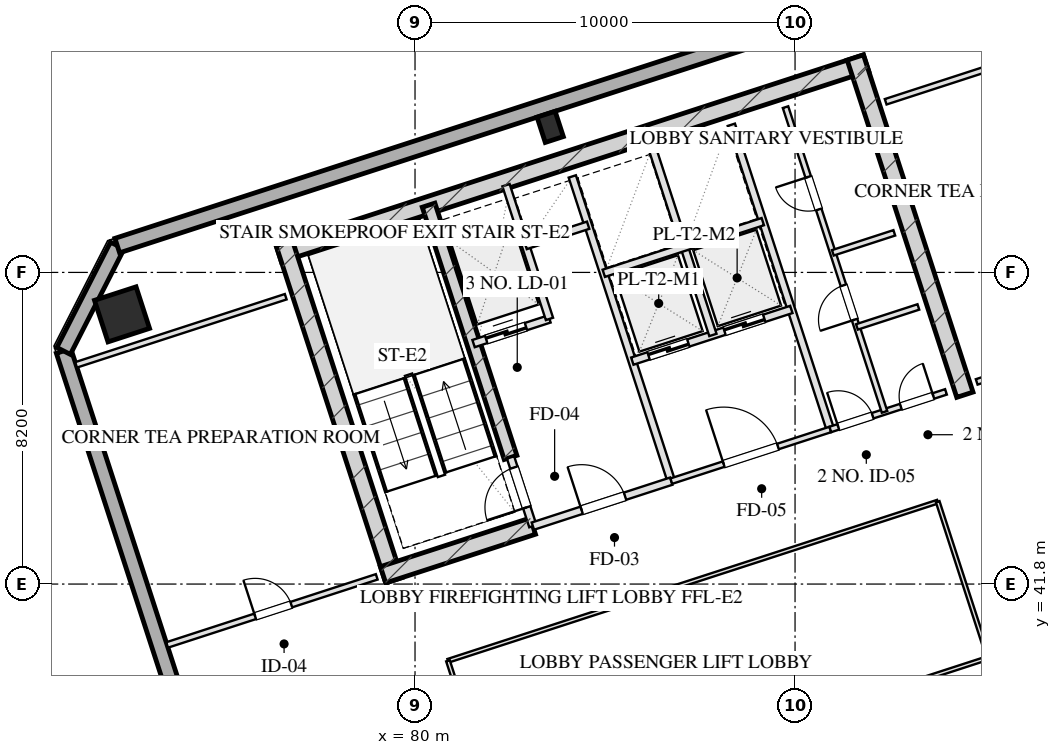
"""IFC4 building model, lengths in metres.
Left out: names, types, materials, properties, quantities, classifications, styles, units other than length and angle.
Written with IfcOpenShell. Run it as: python <this file> out.ifc"""

import sys

from ifc_helpers import new_model, si_unit, direction, frame, frame_2d, origin, origin_2d, place, context, subcontext, project, spatial, rectangle, hollow_rectangle, extrude, element, fill, save


model = new_model("IFC4")
c1 = context("Model", 3, precision=1e-05, world=origin(), true_north=direction((0.0, 1.0)))
c2 = subcontext(c1, "Body", "Model", "MODEL_VIEW")
j1 = project(units=[si_unit("LENGTHUNIT", "METRE"), si_unit("PLANEANGLEUNIT", "RADIAN")], contexts=[c1])
p1 = place(None, origin())
s1 = spatial("IfcSite", under=j1, at=p1, CompositionType="ELEMENT")
p2 = place(p1, origin())
s2 = spatial("IfcBuilding", under=s1, at=p2, CompositionType="ELEMENT")
p3 = place(p2, frame((0.0, 0.0, 209.3)))
s3 = spatial("IfcBuildingStorey", under=s2, at=p3, CompositionType="ELEMENT", Elevation=209.3)
p4 = place(p3, frame((76.415, 50.489, 0.0), z_axis=(0.0, 0.0, 1.0), x_axis=(0.951056810414, 0.309016089169, 0.0)))
e1 = element("IfcWall", 1, at=p4, inside=s3, PredefinedType="SHEAR", context=c2, shape_type="SweptSolid", body=[
    extrude(rectangle(XDim=16.25, YDim=0.45, at=frame_2d((8.125, 0.0))), origin(), (0.0, 0.0, 1.0), 3.45),
])
for number, where, z_axis, x_axis in (
    (2, (79.442, 41.899, 0.0), (0.0, 0.0, 1.0), (-0.309, 0.951, 0.0)),
    (3, (94.469, 46.781, 0.0), (0.0, 0.0, 1.0), (-0.309, 0.951, 0.0)),
):
    element("IfcWall", number, at=place(p3, frame(where, z_axis=z_axis, x_axis=x_axis)), inside=s3, PredefinedType="SHEAR", context=c2, shape_type="SweptSolid", body=[
        extrude(rectangle(XDim=9.33, YDim=0.45, at=frame_2d((4.665, 0.0))), origin(), (0.0, 0.0, 1.0), 3.45),
    ])
p5 = place(p3, frame((82.514, 45.131, 0.0), z_axis=(0.0, 0.0, 1.0), x_axis=(-0.308988790936, 0.951065679686, 0.0)))
e4 = element("IfcWall", 4, at=p5, inside=s3, PredefinedType="SHEAR", context=c2, shape_type="SweptSolid", body=[
    extrude(rectangle(XDim=6.98, YDim=0.35, at=frame_2d((3.49, 0.0))), origin(), (0.0, 0.0, 1.0), 3.45),
])
p6 = place(p3, frame((79.159, 42.043, 0.0), z_axis=(0.0, 0.0, 1.0), x_axis=(0.951047485828, 0.309044785913, 0.0)))
e5 = element("IfcWall", 5, at=p6, inside=s3, PredefinedType="SHEAR", context=c2, shape_type="SweptSolid", body=[
    extrude(rectangle(XDim=4.145, YDim=0.45, at=frame_2d((2.073, 0.0))), origin(), (0.0, 0.0, 1.0), 3.45),
])
for number, where, z_axis, x_axis in (
    (6, (95.572, 56.461, 0.0), (0.0, 0.0, 1.0), (0.951, 0.309, 0.0)),
    (7, (72.29, 48.896, 0.0), (0.0, 0.0, 1.0), (0.951, 0.309, 0.0)),
):
    element("IfcColumn", number, at=place(p3, frame(where, z_axis=z_axis, x_axis=x_axis)), inside=s3, PredefinedType="COLUMN", context=c2, shape_type="SweptSolid", body=[
        extrude(hollow_rectangle(XDim=1.15, YDim=1.15, WallThickness=0.04, at=origin_2d()), origin(), (0.0, 0.0, 1.0), 3.451),
    ])
p7 = place(p3, frame((83.557, 53.83, 0.0), z_axis=(0.0, 0.0, 1.0), x_axis=(0.951056516295, 0.309016994375, 0.0)))
e8 = element("IfcColumn", 8, at=p7, inside=s3, PredefinedType="COLUMN", context=c2, shape_type="SweptSolid", body=[
    extrude(hollow_rectangle(XDim=0.5, YDim=0.7, WallThickness=0.025, at=origin_2d()), origin(), (0.0, 0.0, 1.0), 3.451),
])
p8 = place(p3, frame((82.618, 11.414, 0.0), z_axis=(0.0, 0.0, 1.0), x_axis=(-0.309016491071, 0.951056679828, 0.0)))
e9 = element("IfcWall", 9, at=p8, inside=s3, PredefinedType="SOLIDWALL", context=c2, shape_type="SweptSolid", body=[
    extrude(rectangle(XDim=38.4, YDim=0.4, at=frame_2d((19.2, 0.0))), origin(), (0.0, 0.0, 1.0), 2.61),
])
p9 = place(p8, frame((20.75, 0.0, 0.75)))
e10 = element("IfcOpeningElement", 10, at=p9, cuts=e9, PredefinedType="OPENING", context=c2, shape_type="SweptSolid", body=[
    extrude(rectangle(XDim=2.1, YDim=1.46, at=frame_2d((1.05, 0.73))), frame((0.0, 0.21, 0.0), z_axis=(0.0, -1.0, 0.0), x_axis=(1.0, 0.0, 0.0)), (0.0, 0.0, 1.0), 0.42),
])
p10 = place(p8, frame((24.55, 0.0, 0.75)))
e11 = element("IfcOpeningElement", 11, at=p10, cuts=e9, PredefinedType="OPENING", context=c2, shape_type="SweptSolid", body=[
    extrude(rectangle(XDim=2.1, YDim=1.46, at=frame_2d((1.05, 0.73))), frame((0.0, 0.21, 0.0), z_axis=(0.0, -1.0, 0.0), x_axis=(1.0, 0.0, 0.0)), (0.0, 0.0, 1.0), 0.42),
])
p11 = place(p8, frame((15.55, 0.0, 0.0)))
e12 = element("IfcOpeningElement", 12, at=p11, cuts=e9, PredefinedType="OPENING", context=c2, shape_type="SweptSolid", body=[
    extrude(rectangle(XDim=1.1, YDim=2.15, at=frame_2d((0.55, 1.075))), frame((0.0, 0.21, 0.0), z_axis=(0.0, -1.0, 0.0), x_axis=(1.0, 0.0, 0.0)), (0.0, 0.0, 1.0), 0.42),
])
p12 = place(p3, frame((70.752, 47.934, 0.0), z_axis=(0.0, 0.0, 1.0), x_axis=(0.453949291228, 0.891027519774, 0.0)))
e13 = element("IfcWall", 13, at=p12, inside=s3, PredefinedType="SOLIDWALL", context=c2, shape_type="SweptSolid", body=[
    extrude(rectangle(XDim=3.111, YDim=0.4, at=frame_2d((1.556, 0.0))), origin(), (0.0, 0.0, 1.0), 2.61),
])
p13 = place(p3, frame((72.165, 50.706, 0.0), z_axis=(0.0, 0.0, 1.0), x_axis=(0.951058012937, 0.309012388148, 0.0)))
e14 = element("IfcWall", 14, at=p13, inside=s3, PredefinedType="SOLIDWALL", context=c2, shape_type="SweptSolid", body=[
    extrude(rectangle(XDim=23.6, YDim=0.4, at=frame_2d((11.8, 0.0))), origin(), (0.0, 0.0, 1.0), 2.61),
])
p14 = place(p3, frame((83.101, 43.324, 0.0), z_axis=(0.0, 0.0, 1.0), x_axis=(-0.309048298632, 0.951046344356, 0.0)))
e15 = element("IfcWall", 15, at=p14, inside=s3, PredefinedType="PARTITIONING", context=c2, shape_type="SweptSolid", body=[
    extrude(rectangle(XDim=1.9, YDim=0.2, at=frame_2d((0.95, 0.0))), origin(), (0.0, 0.0, 1.0), 3.175),
])
p15 = place(p14, frame((0.52, 0.0, 0.0)))
e16 = element("IfcOpeningElement", 16, at=p15, cuts=e15, PredefinedType="OPENING", context=c2, shape_type="SweptSolid", body=[
    extrude(rectangle(XDim=1.1, YDim=2.05, at=frame_2d((0.55, 1.025))), frame((0.0, 0.11, 0.0), z_axis=(0.0, -1.0, 0.0), x_axis=(1.0, 0.0, 0.0)), (0.0, 0.0, 1.0), 0.22),
])
p16 = place(p3, frame((86.743, 44.508, 0.0), z_axis=(0.0, 0.0, 1.0), x_axis=(-0.309016001439, 0.951056838919, 0.0)))
e17 = element("IfcWall", 17, at=p16, inside=s3, PredefinedType="PARTITIONING", context=c2, shape_type="SweptSolid", body=[
    extrude(rectangle(XDim=8.43, YDim=0.2, at=frame_2d((4.215, 0.0))), origin(), (0.0, 0.0, 1.0), 3.175),
])
p17 = place(p3, frame((83.101, 43.324, 0.0), z_axis=(0.0, 0.0, 1.0), x_axis=(0.951052804469, 0.309028417967, 0.0)))
e18 = element("IfcWall", 18, at=p17, inside=s3, PredefinedType="PARTITIONING", context=c2, shape_type="SweptSolid", body=[
    extrude(rectangle(XDim=3.83, YDim=0.2, at=frame_2d((1.915, 0.0))), origin(), (0.0, 0.0, 1.0), 3.175),
])
p18 = place(p17, frame((1.35, 0.0, 0.0)))
e19 = element("IfcOpeningElement", 19, at=p18, cuts=e18, PredefinedType="OPENING", context=c2, shape_type="SweptSolid", body=[
    extrude(rectangle(XDim=1.2, YDim=2.05, at=frame_2d((0.6, 1.025))), frame((0.0, 0.11, 0.0), z_axis=(0.0, -1.0, 0.0), x_axis=(1.0, 0.0, 0.0)), (0.0, 0.0, 1.0), 0.22),
])
p19 = place(p3, frame((81.54, 48.127, 0.0), z_axis=(0.0, 0.0, 1.0), x_axis=(0.951062257173, 0.308999325213, 0.0)))
e20 = element("IfcWall", 20, at=p19, inside=s3, PredefinedType="PARTITIONING", context=c2, shape_type="SweptSolid", body=[
    extrude(rectangle(XDim=2.1, YDim=0.2, at=frame_2d((1.05, 0.0))), origin(), (0.0, 0.0, 1.0), 3.175),
])
p20 = place(p19, frame((0.35, 0.0, 0.0)))
e21 = element("IfcOpeningElement", 21, at=p20, cuts=e20, PredefinedType="OPENING", context=c2, shape_type="SweptSolid", body=[
    extrude(rectangle(XDim=1.1, YDim=2.05, at=frame_2d((0.55, 1.025))), frame((0.0, 0.11, 0.0), z_axis=(0.0, -1.0, 0.0), x_axis=(1.0, 0.0, 0.0)), (0.0, 0.0, 1.0), 0.22),
])
p21 = place(p3, frame((83.538, 48.776, 0.0), z_axis=(0.0, 0.0, 1.0), x_axis=(-0.3089935693, 0.951064127245, 0.0)))
e22 = element("IfcWall", 22, at=p21, inside=s3, PredefinedType="PARTITIONING", context=c2, shape_type="SweptSolid", body=[
    extrude(rectangle(XDim=3.7, YDim=0.2, at=frame_2d((1.85, 0.0))), origin(), (0.0, 0.0, 1.0), 3.175),
])
p22 = place(p3, frame((82.91, 50.707, 0.0), z_axis=(0.0, 0.0, 1.0), x_axis=(0.951041328149, 0.309063734775, 0.0)))
e23 = element("IfcWall", 23, at=p22, inside=s3, PredefinedType="PARTITIONING", context=c2, shape_type="SweptSolid", body=[
    extrude(rectangle(XDim=1.73, YDim=0.2, at=frame_2d((0.865, 0.0))), origin(), (0.0, 0.0, 1.0), 3.175),
])
p23 = place(p3, frame((90.928, 45.868, 0.0), z_axis=(0.0, 0.0, 1.0), x_axis=(-0.309042196757, 0.951048327176, 0.0)))
e24 = element("IfcWall", 24, at=p23, inside=s3, PredefinedType="PARTITIONING", context=c2, shape_type="SweptSolid", body=[
    extrude(rectangle(XDim=8.43, YDim=0.2, at=frame_2d((4.215, 0.0))), origin(), (0.0, 0.0, 1.0), 3.175),
])
p24 = place(p3, frame((86.743, 44.508, 0.0), z_axis=(0.0, 0.0, 1.0), x_axis=(0.951063829732, 0.308994485023, 0.0)))
e25 = element("IfcWall", 25, at=p24, inside=s3, PredefinedType="PARTITIONING", context=c2, shape_type="SweptSolid", body=[
    extrude(rectangle(XDim=4.4, YDim=0.15, at=frame_2d((2.2, 0.0))), origin(), (0.0, 0.0, 1.0), 3.175),
])
p25 = place(p24, frame((1.45, 0.0, 0.0)))
e26 = element("IfcOpeningElement", 26, at=p25, cuts=e25, PredefinedType="OPENING", context=c2, shape_type="SweptSolid", body=[
    extrude(rectangle(XDim=1.5, YDim=2.05, at=frame_2d((0.75, 1.025))), frame((0.0, 0.085, 0.0), z_axis=(0.0, -1.0, 0.0), x_axis=(1.0, 0.0, 0.0)), (0.0, 0.0, 1.0), 0.17),
])
p26 = place(p3, frame((85.718, 47.666, 0.0), z_axis=(0.0, 0.0, 1.0), x_axis=(0.951058531764, 0.30901079133, 0.0)))
e27 = element("IfcWall", 27, at=p26, inside=s3, PredefinedType="PARTITIONING", context=c2, shape_type="SweptSolid", body=[
    extrude(rectangle(XDim=4.4, YDim=0.2, at=frame_2d((2.2, 0.0))), origin(), (0.0, 0.0, 1.0), 3.175),
])
p27 = place(p26, frame((0.45, 0.0, 0.0)))
e28 = element("IfcOpeningElement", 28, at=p27, cuts=e27, PredefinedType="OPENING", context=c2, shape_type="SweptSolid", body=[
    extrude(rectangle(XDim=1.1, YDim=2.05, at=frame_2d((0.55, 1.025))), frame((0.0, 0.11, 0.0), z_axis=(0.0, -1.0, 0.0), x_axis=(1.0, 0.0, 0.0)), (0.0, 0.0, 1.0), 0.22),
])
p28 = place(p26, frame((2.55, 0.0, 0.0)))
e29 = element("IfcOpeningElement", 29, at=p28, cuts=e27, PredefinedType="OPENING", context=c2, shape_type="SweptSolid", body=[
    extrude(rectangle(XDim=1.1, YDim=2.05, at=frame_2d((0.55, 1.025))), frame((0.0, 0.11, 0.0), z_axis=(0.0, -1.0, 0.0), x_axis=(1.0, 0.0, 0.0)), (0.0, 0.0, 1.0), 0.22),
])
p29 = place(p3, frame((87.838, 48.354, 0.0), z_axis=(0.0, 0.0, 1.0), x_axis=(-0.3090093719, 0.951058992953, 0.0)))
e30 = element("IfcWall", 30, at=p29, inside=s3, PredefinedType="PARTITIONING", context=c2, shape_type="SweptSolid", body=[
    extrude(rectangle(XDim=5.11, YDim=0.2, at=frame_2d((2.555, 0.0))), origin(), (0.0, 0.0, 1.0), 3.175),
])
p30 = place(p3, frame((84.967, 49.977, 0.0), z_axis=(0.0, 0.0, 1.0), x_axis=(0.951063829732, 0.308994485023, 0.0)))
e31 = element("IfcWall", 31, at=p30, inside=s3, PredefinedType="PARTITIONING", context=c2, shape_type="SweptSolid", body=[
    extrude(rectangle(XDim=4.4, YDim=0.2, at=frame_2d((2.2, 0.0))), origin(), (0.0, 0.0, 1.0), 3.175),
])
p31 = place(p3, frame((90.928, 45.868, 0.0), z_axis=(0.0, 0.0, 1.0), x_axis=(0.951059297078, 0.309008435874, 0.0)))
e32 = element("IfcWall", 32, at=p31, inside=s3, PredefinedType="PARTITIONING", context=c2, shape_type="SweptSolid", body=[
    extrude(rectangle(XDim=3.2, YDim=0.15, at=frame_2d((1.6, 0.0))), origin(), (0.0, 0.0, 1.0), 3.175),
])
p32 = place(p31, frame((0.22, 0.0, 0.0)))
e33 = element("IfcOpeningElement", 33, at=p32, cuts=e32, PredefinedType="OPENING", context=c2, shape_type="SweptSolid", body=[
    extrude(rectangle(XDim=0.95, YDim=2.05, at=frame_2d((0.475, 1.025))), frame((0.0, 0.085, 0.0), z_axis=(0.0, -1.0, 0.0), x_axis=(1.0, 0.0, 0.0)), (0.0, 0.0, 1.0), 0.17),
])
p33 = place(p31, frame((1.95, 0.0, 0.0)))
e34 = element("IfcOpeningElement", 34, at=p33, cuts=e32, PredefinedType="OPENING", context=c2, shape_type="SweptSolid", body=[
    extrude(rectangle(XDim=0.9, YDim=2.05, at=frame_2d((0.45, 1.025))), frame((0.0, 0.085, 0.0), z_axis=(0.0, -1.0, 0.0), x_axis=(1.0, 0.0, 0.0)), (0.0, 0.0, 1.0), 0.17),
])
p34 = place(p3, frame((92.355, 46.331, 0.0), z_axis=(0.0, 0.0, 1.0), x_axis=(-0.309007490203, 0.951059604335, 0.0)))
e35 = element("IfcWall", 35, at=p34, inside=s3, PredefinedType="PARTITIONING", context=c2, shape_type="SweptSolid", body=[
    extrude(rectangle(XDim=8.43, YDim=0.15, at=frame_2d((4.215, 0.0))), origin(), (0.0, 0.0, 1.0), 3.175),
])
p35 = place(p34, frame((2.55, 0.0, 0.0)))
e36 = element("IfcOpeningElement", 36, at=p35, cuts=e35, PredefinedType="OPENING", context=c2, shape_type="SweptSolid", body=[
    extrude(rectangle(XDim=0.95, YDim=2.05, at=frame_2d((0.475, 1.025))), frame((0.0, 0.085, 0.0), z_axis=(0.0, -1.0, 0.0), x_axis=(1.0, 0.0, 0.0)), (0.0, 0.0, 1.0), 0.17),
])
p36 = place(p34, frame((5.6, 0.0, 0.0)))
e37 = element("IfcOpeningElement", 37, at=p36, cuts=e35, PredefinedType="OPENING", context=c2, shape_type="SweptSolid", body=[
    extrude(rectangle(XDim=0.9, YDim=2.05, at=frame_2d((0.45, 1.025))), frame((0.0, 0.085, 0.0), z_axis=(0.0, -1.0, 0.0), x_axis=(1.0, 0.0, 0.0)), (0.0, 0.0, 1.0), 0.17),
])
p37 = place(p3, frame((90.995, 50.516, 0.0), z_axis=(0.0, 0.0, 1.0), x_axis=(0.951040401051, 0.309066587596, 0.0)))
e38 = element("IfcWall", 38, at=p37, inside=s3, PredefinedType="PARTITIONING", context=c2, shape_type="SweptSolid", body=[
    extrude(rectangle(XDim=1.7, YDim=0.15, at=frame_2d((0.85, 0.0))), origin(), (0.0, 0.0, 1.0), 3.175),
])
p38 = place(p3, frame((91.628, 48.566, 0.0), z_axis=(0.0, 0.0, 1.0), x_axis=(0.951054116971, 0.309024378638, 0.0)))
e39 = element("IfcWall", 39, at=p38, inside=s3, PredefinedType="PARTITIONING", context=c2, shape_type="SweptSolid", body=[
    extrude(rectangle(XDim=1.7, YDim=0.15, at=frame_2d((0.85, 0.0))), origin(), (0.0, 0.0, 1.0), 3.175),
])
p39 = place(p3, frame((71.081, 47.568, 0.0), z_axis=(0.0, 0.0, 1.0), x_axis=(0.951059431056, 0.309008023519, 0.0)))
e40 = element("IfcWall", 40, at=p39, inside=s3, PredefinedType="PARTITIONING", context=c2, shape_type="SweptSolid", body=[
    extrude(rectangle(XDim=5.8, YDim=0.15, at=frame_2d((2.9, 0.0))), origin(), (0.0, 0.0, 1.0), 3.175),
])
p40 = place(p3, frame((73.476, 40.197, 0.0), z_axis=(0.0, 0.0, 1.0), x_axis=(0.951059431056, 0.309008023519, 0.0)))
e41 = element("IfcWall", 41, at=p40, inside=s3, PredefinedType="PARTITIONING", context=c2, shape_type="SweptSolid", body=[
    extrude(rectangle(XDim=5.8, YDim=0.15, at=frame_2d((2.9, 0.0))), origin(), (0.0, 0.0, 1.0), 3.175),
])
p41 = place(p40, frame((2.436, 0.0, 0.0)))
e42 = element("IfcOpeningElement", 42, at=p41, cuts=e41, PredefinedType="OPENING", context=c2, shape_type="SweptSolid", body=[
    extrude(rectangle(XDim=1.0, YDim=2.05, at=frame_2d((0.5, 1.025))), frame((0.0, 0.085, 0.0), z_axis=(0.0, -1.0, 0.0), x_axis=(1.0, 0.0, 0.0)), (0.0, 0.0, 1.0), 0.17),
])
p42 = place(p3, frame((92.385, 54.49, 0.0), z_axis=(0.0, 0.0, 1.0), x_axis=(0.951055112834, 0.309021313752, 0.0)))
e43 = element("IfcWall", 43, at=p42, inside=s3, PredefinedType="PARTITIONING", context=c2, shape_type="SweptSolid", body=[
    extrude(rectangle(XDim=5.2, YDim=0.15, at=frame_2d((2.6, 0.0))), origin(), (0.0, 0.0, 1.0), 3.175),
])
p43 = place(p3, frame((94.78, 47.119, 0.0), z_axis=(0.0, 0.0, 1.0), x_axis=(0.951055112834, 0.309021313752, 0.0)))
e44 = element("IfcWall", 44, at=p43, inside=s3, PredefinedType="PARTITIONING", context=c2, shape_type="SweptSolid", body=[
    extrude(rectangle(XDim=5.2, YDim=0.15, at=frame_2d((2.6, 0.0))), origin(), (0.0, 0.0, 1.0), 3.175),
])
p44 = place(p43, frame((2.184, 0.0, 0.0)))
e45 = element("IfcOpeningElement", 45, at=p44, cuts=e44, PredefinedType="OPENING", context=c2, shape_type="SweptSolid", body=[
    extrude(rectangle(XDim=1.05, YDim=2.05, at=frame_2d((0.525, 1.025))), frame((0.0, 0.085, 0.0), z_axis=(0.0, -1.0, 0.0), x_axis=(1.0, 0.0, 0.0)), (0.0, 0.0, 1.0), 0.17),
])
p45 = place(p3, frame((80.867, 39.781, 0.0), z_axis=(0.0, 0.0, 1.0), x_axis=(0.951054192928, 0.309024144872, 0.0)))
e46 = element("IfcWall", 46, at=p45, inside=s3, PredefinedType="MOVABLE", context=c2, shape_type="SweptSolid", body=[
    extrude(rectangle(XDim=13.55, YDim=0.1, at=frame_2d((6.775, 0.0))), origin(), (0.0, 0.0, 1.0), 3.175),
])
p46 = place(p3, frame((86.009, 23.955, 0.0), z_axis=(0.0, 0.0, 1.0), x_axis=(-0.309022042254, 0.951054876125, 0.0)))
e47 = element("IfcWall", 47, at=p46, inside=s3, PredefinedType="MOVABLE", context=c2, shape_type="SweptSolid", body=[
    extrude(rectangle(XDim=16.64, YDim=0.1, at=frame_2d((8.32, 0.0))), origin(), (0.0, 0.0, 1.0), 3.175),
])
p47 = place(p46, frame((1.944, 0.0, 0.0)))
e48 = element("IfcOpeningElement", 48, at=p47, cuts=e47, PredefinedType="OPENING", context=c2, shape_type="SweptSolid", body=[
    extrude(rectangle(XDim=1.1, YDim=2.05, at=frame_2d((0.55, 1.025))), frame((0.0, 0.06, 0.0), z_axis=(0.0, -1.0, 0.0), x_axis=(1.0, 0.0, 0.0)), (0.0, 0.0, 1.0), 0.12),
])
p48 = place(p46, frame((14.264, 0.0, 0.0)))
e49 = element("IfcOpeningElement", 49, at=p48, cuts=e47, PredefinedType="OPENING", context=c2, shape_type="SweptSolid", body=[
    extrude(rectangle(XDim=1.1, YDim=2.05, at=frame_2d((0.55, 1.025))), frame((0.0, 0.06, 0.0), z_axis=(0.0, -1.0, 0.0), x_axis=(1.0, 0.0, 0.0)), (0.0, 0.0, 1.0), 0.12),
])
p49 = place(p3, frame((98.896, 28.142, 0.0), z_axis=(0.0, 0.0, 1.0), x_axis=(-0.30901773025, 0.951056277195, 0.0)))
e50 = element("IfcWall", 50, at=p49, inside=s3, PredefinedType="MOVABLE", context=c2, shape_type="SweptSolid", body=[
    extrude(rectangle(XDim=16.64, YDim=0.1, at=frame_2d((8.32, 0.0))), origin(), (0.0, 0.0, 1.0), 3.175),
])
p50 = place(p49, frame((7.68, 0.0, 0.0)))
e51 = element("IfcOpeningElement", 51, at=p50, cuts=e50, PredefinedType="OPENING", context=c2, shape_type="SweptSolid", body=[
    extrude(rectangle(XDim=1.1, YDim=2.05, at=frame_2d((0.55, 1.025))), frame((0.0, 0.06, 0.0), z_axis=(0.0, -1.0, 0.0), x_axis=(1.0, 0.0, 0.0)), (0.0, 0.0, 1.0), 0.12),
])
p51 = place(p3, frame((82.202, 35.672, 0.0), z_axis=(0.0, 0.0, 1.0), x_axis=(0.951059488241, 0.309007847517, 0.0)))
e52 = element("IfcWall", 52, at=p51, inside=s3, PredefinedType="MOVABLE", context=c2, shape_type="SweptSolid", body=[
    extrude(rectangle(XDim=13.55, YDim=0.1, at=frame_2d((6.775, 0.0))), origin(), (0.0, 0.0, 1.0), 3.175),
])
p52 = place(p15, origin())
e53 = element("IfcDoor", 53, at=p52, inside=s3, OperationType="SINGLE_SWING_LEFT", PredefinedType="DOOR", context=c2, shape_type="SweptSolid", body=[
    extrude(rectangle(XDim=1.1, YDim=2.05, at=frame_2d((0.55, 1.025))), frame((0.0, 0.025, 0.0), z_axis=(0.0, -1.0, 0.0), x_axis=(1.0, 0.0, 0.0)), (0.0, 0.0, 1.0), 0.05),
])
fill(e16, e53)
p53 = place(p18, origin())
e54 = element("IfcDoor", 54, at=p53, inside=s3, OperationType="SINGLE_SWING_LEFT", PredefinedType="DOOR", context=c2, shape_type="SweptSolid", body=[
    extrude(rectangle(XDim=1.2, YDim=2.05, at=frame_2d((0.6, 1.025))), frame((0.0, 0.025, 0.0), z_axis=(0.0, -1.0, 0.0), x_axis=(1.0, 0.0, 0.0)), (0.0, 0.0, 1.0), 0.05),
])
fill(e19, e54)
p54 = place(p20, origin())
e55 = element("IfcDoor", 55, at=p54, inside=s3, OperationType="DOUBLE_DOOR_SLIDING", PredefinedType="DOOR", context=c2, shape_type="SweptSolid", body=[
    extrude(rectangle(XDim=1.1, YDim=2.05, at=frame_2d((0.55, 1.025))), frame((0.0, 0.025, 0.0), z_axis=(0.0, -1.0, 0.0), x_axis=(1.0, 0.0, 0.0)), (0.0, 0.0, 1.0), 0.05),
])
fill(e21, e55)
p55 = place(p25, origin())
e56 = element("IfcDoor", 56, at=p55, inside=s3, OperationType="SINGLE_SWING_LEFT", PredefinedType="DOOR", context=c2, shape_type="SweptSolid", body=[
    extrude(rectangle(XDim=1.5, YDim=2.05, at=frame_2d((0.75, 1.025))), frame((0.0, 0.025, 0.0), z_axis=(0.0, -1.0, 0.0), x_axis=(1.0, 0.0, 0.0)), (0.0, 0.0, 1.0), 0.05),
])
fill(e26, e56)
p56 = place(p27, origin())
e57 = element("IfcDoor", 57, at=p56, inside=s3, OperationType="DOUBLE_DOOR_SLIDING", PredefinedType="DOOR", context=c2, shape_type="SweptSolid", body=[
    extrude(rectangle(XDim=1.1, YDim=2.05, at=frame_2d((0.55, 1.025))), frame((0.0, 0.025, 0.0), z_axis=(0.0, -1.0, 0.0), x_axis=(1.0, 0.0, 0.0)), (0.0, 0.0, 1.0), 0.05),
])
fill(e28, e57)
p57 = place(p28, origin())
e58 = element("IfcDoor", 58, at=p57, inside=s3, OperationType="DOUBLE_DOOR_SLIDING", PredefinedType="DOOR", context=c2, shape_type="SweptSolid", body=[
    extrude(rectangle(XDim=1.1, YDim=2.05, at=frame_2d((0.55, 1.025))), frame((0.0, 0.025, 0.0), z_axis=(0.0, -1.0, 0.0), x_axis=(1.0, 0.0, 0.0)), (0.0, 0.0, 1.0), 0.05),
])
fill(e29, e58)
p58 = place(p32, origin())
e59 = element("IfcDoor", 59, at=p58, inside=s3, OperationType="SINGLE_SWING_LEFT", PredefinedType="DOOR", context=c2, shape_type="SweptSolid", body=[
    extrude(rectangle(XDim=0.95, YDim=2.05, at=frame_2d((0.475, 1.025))), frame((0.0, 0.025, 0.0), z_axis=(0.0, -1.0, 0.0), x_axis=(1.0, 0.0, 0.0)), (0.0, 0.0, 1.0), 0.05),
])
fill(e33, e59)
p59 = place(p33, origin())
e60 = element("IfcDoor", 60, at=p59, inside=s3, OperationType="SINGLE_SWING_RIGHT", PredefinedType="DOOR", context=c2, shape_type="SweptSolid", body=[
    extrude(rectangle(XDim=0.9, YDim=2.05, at=frame_2d((0.45, 1.025))), frame((0.0, 0.025, 0.0), z_axis=(0.0, -1.0, 0.0), x_axis=(1.0, 0.0, 0.0)), (0.0, 0.0, 1.0), 0.05),
])
fill(e34, e60)
p60 = place(p35, origin())
e61 = element("IfcDoor", 61, at=p60, inside=s3, OperationType="SINGLE_SWING_LEFT", PredefinedType="DOOR", context=c2, shape_type="SweptSolid", body=[
    extrude(rectangle(XDim=0.95, YDim=2.05, at=frame_2d((0.475, 1.025))), frame((0.0, 0.025, 0.0), z_axis=(0.0, -1.0, 0.0), x_axis=(1.0, 0.0, 0.0)), (0.0, 0.0, 1.0), 0.05),
])
fill(e36, e61)
p61 = place(p36, origin())
e62 = element("IfcDoor", 62, at=p61, inside=s3, OperationType="SINGLE_SWING_RIGHT", PredefinedType="DOOR", context=c2, shape_type="SweptSolid", body=[
    extrude(rectangle(XDim=0.9, YDim=2.05, at=frame_2d((0.45, 1.025))), frame((0.0, 0.025, 0.0), z_axis=(0.0, -1.0, 0.0), x_axis=(1.0, 0.0, 0.0)), (0.0, 0.0, 1.0), 0.05),
])
fill(e37, e62)
p62 = place(p41, origin())
e63 = element("IfcDoor", 63, at=p62, inside=s3, OperationType="SINGLE_SWING_LEFT", PredefinedType="DOOR", context=c2, shape_type="SweptSolid", body=[
    extrude(rectangle(XDim=1.0, YDim=2.05, at=frame_2d((0.5, 1.025))), frame((0.0, 0.025, 0.0), z_axis=(0.0, -1.0, 0.0), x_axis=(1.0, 0.0, 0.0)), (0.0, 0.0, 1.0), 0.05),
])
fill(e42, e63)
save(model, sys.argv[1])
